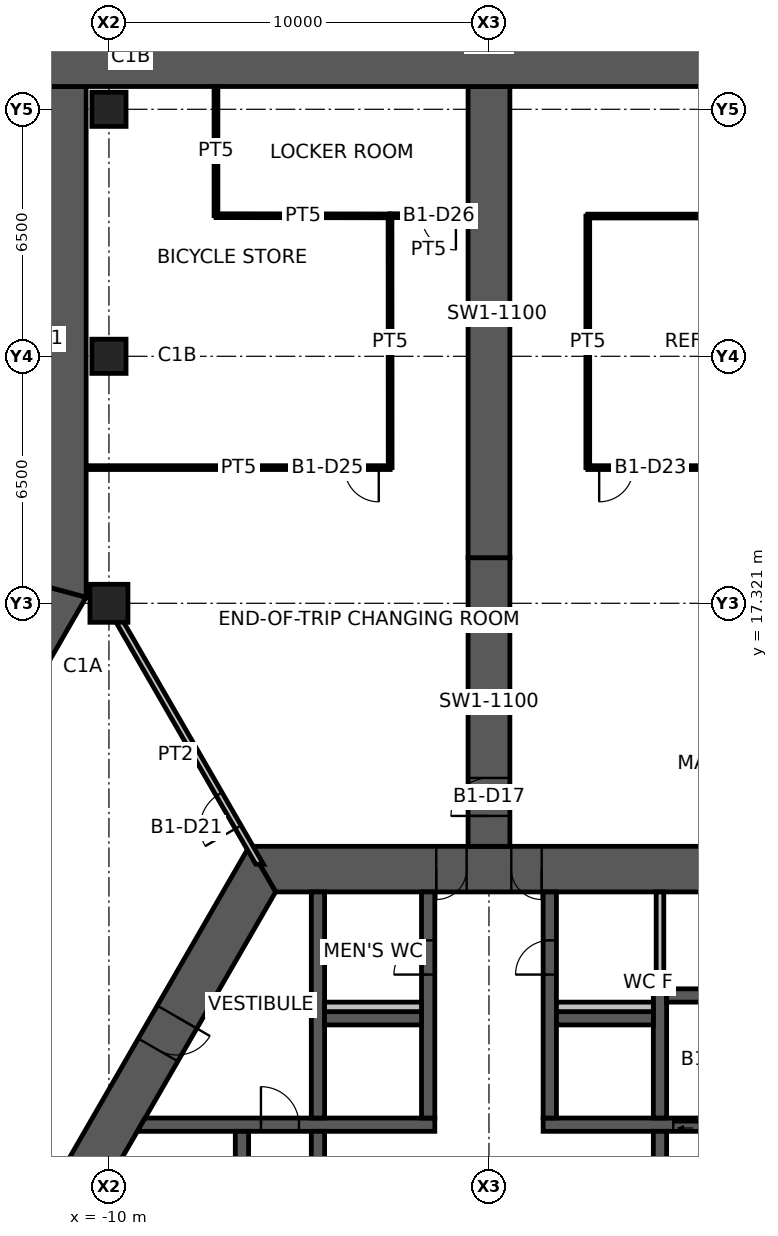
"""IFC4 building model, lengths in metres.
Left out: names, types, materials, properties, quantities, classifications, styles, units other than length and angle.
Written with IfcOpenShell. Run it as: python <this file> out.ifc"""

import sys

from ifc_helpers import new_model, si_unit, direction, frame, frame_2d, origin, origin_2d, place, context, subcontext, project, spatial, polyline, rectangle, hollow_rectangle, outline, extrude, element, fill, save


model = new_model("IFC4")
c1 = context("Model", 3, precision=1e-05, world=origin(), true_north=direction((0.0, 1.0)))
c2 = subcontext(c1, "Body", "Model", "MODEL_VIEW")
j1 = project(units=[si_unit("LENGTHUNIT", "METRE"), si_unit("PLANEANGLEUNIT", "RADIAN")], contexts=[c1])
p1 = place(None, origin())
s1 = spatial("IfcSite", under=j1, at=p1, CompositionType="ELEMENT")
p2 = place(p1, origin())
s2 = spatial("IfcBuilding", under=s1, at=p2, CompositionType="ELEMENT")
p3 = place(p2, frame((0.0, 0.0, -5.0)))
s3 = spatial("IfcBuildingStorey", under=s2, at=p3, CompositionType="ELEMENT", Elevation=-5.0)
p4 = place(p3, frame((-10.0, 17.321, 0.0), z_axis=(0.0, 0.0, 1.0), x_axis=(1.0, 0.0, 0.0)))
e1 = element("IfcColumn", 1, at=p4, inside=s3, PredefinedType="COLUMN", context=c2, shape_type="SweptSolid", body=[
    extrude(hollow_rectangle(XDim=1.0, YDim=1.0, WallThickness=0.06, at=origin_2d()), origin(), (0.0, 0.0, 1.0), 5.0),
])
for number, where, z_axis, x_axis in (
    (2, (-10.0, 23.821, 0.0), (0.0, 0.0, 1.0), (1.0, 0.0, 0.0)),
    (3, (-10.0, 30.321, 0.0), (0.0, 0.0, 1.0), (1.0, 0.0, 0.0)),
):
    element("IfcColumn", number, at=place(p3, frame(where, z_axis=z_axis, x_axis=x_axis)), inside=s3, PredefinedType="COLUMN", context=c2, shape_type="SweptSolid", body=[
        extrude(hollow_rectangle(XDim=0.9, YDim=0.9, WallThickness=0.05, at=origin_2d()), origin(), (0.0, 0.0, 1.0), 5.0),
    ])
p5 = place(p3, frame((5.961, 10.325, 0.0), z_axis=(0.0, 0.0, 1.0), x_axis=(-1.0, 0.0, 0.0)))
e4 = element("IfcWall", 4, at=p5, inside=s3, PredefinedType="SHEAR", context=c2, shape_type="SweptSolid", body=[
    extrude(outline(polyline([(-0.346, -0.6), (4.574, -0.6), (5.374, -0.6), (6.549, -0.6), (7.349, -0.6), (12.269, -0.6), (11.576, 0.6), (7.349, 0.6), (6.549, 0.6), (5.374, 0.6), (4.574, 0.6), (0.346, 0.6), (-0.346, -0.6)])), origin(), (0.0, 0.0, 1.0), 5.0),
])
p6 = place(p5, frame((6.549, 0.0, 0.0)))
e5 = element("IfcOpeningElement", 5, at=p6, cuts=e4, PredefinedType="OPENING", context=c2, shape_type="SweptSolid", body=[
    extrude(rectangle(XDim=0.8, YDim=2.1, at=frame_2d((0.4, 1.05))), frame((0.0, 0.61, 0.0), z_axis=(0.0, -1.0, 0.0), x_axis=(1.0, 0.0, 0.0)), (0.0, 0.0, 1.0), 1.22),
])
p7 = place(p5, frame((4.574, 0.0, 0.0)))
e6 = element("IfcOpeningElement", 6, at=p7, cuts=e4, PredefinedType="OPENING", context=c2, shape_type="SweptSolid", body=[
    extrude(rectangle(XDim=0.8, YDim=2.1, at=frame_2d((0.4, 1.05))), frame((0.0, 0.61, 0.0), z_axis=(0.0, -1.0, 0.0), x_axis=(1.0, 0.0, 0.0)), (0.0, 0.0, 1.0), 1.22),
])
p8 = place(p3, frame((-5.961, 10.325, 0.0), z_axis=(0.0, 0.0, 1.0), x_axis=(-0.500004296715, -0.866022923061, 0.0)))
e7 = element("IfcWall", 7, at=p8, inside=s3, PredefinedType="SHEAR", context=c2, shape_type="SweptSolid", body=[
    extrude(outline(polyline([(-0.346, -0.6), (4.494, -0.6), (5.494, -0.6), (12.269, -0.6), (11.576, 0.6), (5.494, 0.6), (4.494, 0.6), (0.346, 0.6), (-0.346, -0.6)])), origin(), (0.0, 0.0, 1.0), 5.0),
])
p9 = place(p8, frame((4.494, 0.0, 0.0)))
e8 = element("IfcOpeningElement", 8, at=p9, cuts=e7, PredefinedType="OPENING", context=c2, shape_type="SweptSolid", body=[
    extrude(rectangle(XDim=1.0, YDim=2.1, at=frame_2d((0.5, 1.05))), frame((0.0, 0.61, 0.0), z_axis=(0.0, -1.0, 0.0), x_axis=(1.0, 0.0, 0.0)), (0.0, 0.0, 1.0), 1.22),
])
p10 = place(p3, frame((0.0, 10.925, 0.0), z_axis=(0.0, 0.0, 1.0), x_axis=(0.0, 1.0, 0.0)))
e9 = element("IfcWall", 9, at=p10, inside=s3, PredefinedType="SHEAR", context=c2, shape_type="SweptSolid", body=[
    extrude(rectangle(XDim=7.595, YDim=1.1, at=frame_2d((3.798, 0.0))), origin(), (0.0, 0.0, 1.0), 5.0),
])
p11 = place(p10, frame((0.8, 0.0, 0.0)))
e10 = element("IfcOpeningElement", 10, at=p11, cuts=e9, PredefinedType="OPENING", context=c2, shape_type="SweptSolid", body=[
    extrude(rectangle(XDim=1.0, YDim=2.1, at=frame_2d((0.5, 1.05))), frame((0.0, 0.56, 0.0), z_axis=(0.0, -1.0, 0.0), x_axis=(1.0, 0.0, 0.0)), (0.0, 0.0, 1.0), 1.12),
])
p12 = place(p3, frame((0.0, 18.521, 0.0), z_axis=(0.0, 0.0, 1.0), x_axis=(0.0, 1.0, 0.0)))
e11 = element("IfcWall", 11, at=p12, inside=s3, PredefinedType="SHEAR", context=c2, shape_type="SweptSolid", body=[
    extrude(rectangle(XDim=12.4, YDim=1.1, at=frame_2d((6.2, 0.0))), origin(), (0.0, 0.0, 1.0), 5.0),
])
p13 = place(p3, frame((-20.878, 0.878, 0.0), z_axis=(0.0, 0.0, 1.0), x_axis=(0.499998307868, 0.866026380735, 0.0)))
e12 = element("IfcWall", 12, at=p13, inside=s3, PredefinedType="SOLIDWALL", context=c2, shape_type="SweptSolid", body=[
    extrude(outline(polyline([(-0.161, -0.6), (19.518, -0.6), (19.196, 0.6), (0.161, 0.6), (-0.161, -0.6)])), origin(), (0.0, 0.0, 1.0), 5.0),
])
p14 = place(p3, frame((-11.2, 17.642, 0.0), z_axis=(0.0, 0.0, 1.0), x_axis=(0.0, 1.0, 0.0)))
e13 = element("IfcWall", 13, at=p14, inside=s3, PredefinedType="SOLIDWALL", context=c2, shape_type="SweptSolid", body=[
    extrude(outline(polyline([(-0.161, -0.6), (13.278, -0.6), (13.278, 0.6), (0.161, 0.6), (-0.161, -0.6)])), origin(), (0.0, 0.0, 1.0), 5.0),
])
p15 = place(p3, frame((-11.8, 31.521, 0.0), z_axis=(0.0, 0.0, 1.0), x_axis=(1.0, 0.0, 0.0)))
e14 = element("IfcWall", 14, at=p15, inside=s3, PredefinedType="SOLIDWALL", context=c2, shape_type="SweptSolid", body=[
    extrude(rectangle(XDim=23.6, YDim=1.2, at=frame_2d((11.8, 0.0))), origin(), (0.0, 0.0, 1.0), 5.0),
])
p16 = place(p3, frame((-9.151, 3.6, 0.0), z_axis=(0.0, 0.0, 1.0), x_axis=(1.0, 0.0, 0.0)))
e15 = element("IfcWall", 15, at=p16, inside=s3, PredefinedType="SHEAR", context=c2, shape_type="SweptSolid", body=[
    extrude(outline(polyline([(-0.101, -0.175), (3.151, -0.175), (4.151, -0.175), (7.726, -0.175), (7.726, 0.175), (4.151, 0.175), (3.151, 0.175), (0.101, 0.175), (-0.101, -0.175)])), origin(), (0.0, 0.0, 1.0), 5.0),
])
p17 = place(p16, frame((3.151, 0.0, 0.0)))
e16 = element("IfcOpeningElement", 16, at=p17, cuts=e15, PredefinedType="OPENING", context=c2, shape_type="SweptSolid", body=[
    extrude(rectangle(XDim=1.0, YDim=2.1, at=frame_2d((0.5, 1.05))), frame((0.0, 0.185, 0.0), z_axis=(0.0, -1.0, 0.0), x_axis=(1.0, 0.0, 0.0)), (0.0, 0.0, 1.0), 0.37),
])
p18 = place(p3, frame((1.425, 3.6, 0.0), z_axis=(0.0, 0.0, 1.0), x_axis=(1.0, 0.0, 0.0)))
e17 = element("IfcWall", 17, at=p18, inside=s3, PredefinedType="SHEAR", context=c2, shape_type="SweptSolid", body=[
    extrude(outline(polyline([(0.0, -0.175), (3.425, -0.175), (4.725, -0.175), (7.827, -0.175), (7.625, 0.175), (4.725, 0.175), (3.425, 0.175), (0.0, 0.175), (0.0, -0.175)])), origin(), (0.0, 0.0, 1.0), 5.0),
])
p19 = place(p18, frame((3.425, 0.0, 0.0)))
e18 = element("IfcOpeningElement", 18, at=p19, cuts=e17, PredefinedType="OPENING", context=c2, shape_type="SweptSolid", body=[
    extrude(rectangle(XDim=1.3, YDim=2.1, at=frame_2d((0.65, 1.05))), frame((0.0, 0.185, 0.0), z_axis=(0.0, -1.0, 0.0), x_axis=(1.0, 0.0, 0.0)), (0.0, 0.0, 1.0), 0.37),
])
p20 = place(p3, frame((-1.6, 3.775, 0.0), z_axis=(0.0, 0.0, 1.0), x_axis=(0.0, 1.0, 0.0)))
e19 = element("IfcWall", 19, at=p20, inside=s3, PredefinedType="SHEAR", context=c2, shape_type="SweptSolid", body=[
    extrude(rectangle(XDim=5.95, YDim=0.35, at=frame_2d((2.975, 0.0))), origin(), (0.0, 0.0, 1.0), 5.0),
])
p21 = place(p20, frame((3.775, 0.0, 0.0)))
e20 = element("IfcOpeningElement", 20, at=p21, cuts=e19, PredefinedType="OPENING", context=c2, shape_type="SweptSolid", body=[
    extrude(rectangle(XDim=0.9, YDim=2.1, at=frame_2d((0.45, 1.05))), frame((0.0, 0.185, 0.0), z_axis=(0.0, -1.0, 0.0), x_axis=(1.0, 0.0, 0.0)), (0.0, 0.0, 1.0), 0.37),
])
p22 = place(p3, frame((1.6, 3.775, 0.0), z_axis=(0.0, 0.0, 1.0), x_axis=(0.0, 1.0, 0.0)))
e21 = element("IfcWall", 21, at=p22, inside=s3, PredefinedType="SHEAR", context=c2, shape_type="SweptSolid", body=[
    extrude(rectangle(XDim=5.95, YDim=0.35, at=frame_2d((2.975, 0.0))), origin(), (0.0, 0.0, 1.0), 5.0),
])
p23 = place(p22, frame((3.775, 0.0, 0.0)))
e22 = element("IfcOpeningElement", 22, at=p23, cuts=e21, PredefinedType="OPENING", context=c2, shape_type="SweptSolid", body=[
    extrude(rectangle(XDim=0.9, YDim=2.1, at=frame_2d((0.45, 1.05))), frame((0.0, 0.185, 0.0), z_axis=(0.0, -1.0, 0.0), x_axis=(1.0, 0.0, 0.0)), (0.0, 0.0, 1.0), 0.37),
])
p24 = place(p3, frame((-4.5, -3.425, 0.0), z_axis=(0.0, 0.0, 1.0), x_axis=(0.0, 1.0, 0.0)))
e23 = element("IfcWall", 23, at=p24, inside=s3, PredefinedType="SHEAR", context=c2, shape_type="SweptSolid", body=[
    extrude(rectangle(XDim=6.85, YDim=0.35, at=frame_2d((3.425, 0.0))), origin(), (0.0, 0.0, 1.0), 5.0),
])
p25 = place(p24, frame((2.925, 0.0, 0.0)))
e24 = element("IfcOpeningElement", 24, at=p25, cuts=e23, PredefinedType="OPENING", context=c2, shape_type="SweptSolid", body=[
    extrude(rectangle(XDim=1.0, YDim=2.1, at=frame_2d((0.5, 1.05))), frame((0.0, 0.185, 0.0), z_axis=(0.0, -1.0, 0.0), x_axis=(1.0, 0.0, 0.0)), (0.0, 0.0, 1.0), 0.37),
])
p26 = place(p3, frame((4.5, -3.425, 0.0), z_axis=(0.0, 0.0, 1.0), x_axis=(0.0, 1.0, 0.0)))
e25 = element("IfcWall", 25, at=p26, inside=s3, PredefinedType="SHEAR", context=c2, shape_type="SweptSolid", body=[
    extrude(rectangle(XDim=6.85, YDim=0.35, at=frame_2d((3.425, 0.0))), origin(), (0.0, 0.0, 1.0), 5.0),
])
p27 = place(p26, frame((2.925, 0.0, 0.0)))
e26 = element("IfcOpeningElement", 26, at=p27, cuts=e25, PredefinedType="OPENING", context=c2, shape_type="SweptSolid", body=[
    extrude(rectangle(XDim=1.0, YDim=2.1, at=frame_2d((0.5, 1.05))), frame((0.0, 0.185, 0.0), z_axis=(0.0, -1.0, 0.0), x_axis=(1.0, 0.0, 0.0)), (0.0, 0.0, 1.0), 0.37),
])
p28 = place(p3, frame((-6.5, -3.425, 0.0), z_axis=(0.0, 0.0, 1.0), x_axis=(0.0, 1.0, 0.0)))
e27 = element("IfcWall", 27, at=p28, inside=s3, PredefinedType="SHEAR", context=c2, shape_type="SweptSolid", body=[
    extrude(rectangle(XDim=6.85, YDim=0.35, at=frame_2d((3.425, 0.0))), origin(), (0.0, 0.0, 1.0), 5.0),
])
p29 = place(p28, frame((0.1, 0.0, 0.0)))
e28 = element("IfcOpeningElement", 28, at=p29, cuts=e27, PredefinedType="OPENING", context=c2, shape_type="SweptSolid", body=[
    extrude(rectangle(XDim=1.0, YDim=2.1, at=frame_2d((0.5, 1.05))), frame((0.0, 0.185, 0.0), z_axis=(0.0, -1.0, 0.0), x_axis=(1.0, 0.0, 0.0)), (0.0, 0.0, 1.0), 0.37),
])
p30 = place(p3, frame((-4.5, 3.775, 0.0), z_axis=(0.0, 0.0, 1.0), x_axis=(0.0, 1.0, 0.0)))
e29 = element("IfcWall", 29, at=p30, inside=s3, PredefinedType="SHEAR", context=c2, shape_type="SweptSolid", body=[
    extrude(rectangle(XDim=5.95, YDim=0.35, at=frame_2d((2.975, 0.0))), origin(), (0.0, 0.0, 1.0), 5.0),
])
p31 = place(p3, frame((4.5, 3.775, 0.0), z_axis=(0.0, 0.0, 1.0), x_axis=(0.0, 1.0, 0.0)))
e30 = element("IfcWall", 30, at=p31, inside=s3, PredefinedType="SHEAR", context=c2, shape_type="SweptSolid", body=[
    extrude(rectangle(XDim=3.4, YDim=0.35, at=frame_2d((1.7, 0.0))), origin(), (0.0, 0.0, 1.0), 5.0),
])
for number, where, z_axis, x_axis in (
    (31, (-4.325, 6.4, 0.0), (0.0, 0.0, 1.0), (1.0, 0.0, 0.0)),
    (32, (1.775, 6.4, 0.0), (0.0, 0.0, 1.0), (1.0, 0.0, 0.0)),
):
    element("IfcWall", number, at=place(p3, frame(where, z_axis=z_axis, x_axis=x_axis)), inside=s3, PredefinedType="SHEAR", context=c2, shape_type="SweptSolid", body=[
        extrude(rectangle(XDim=2.55, YDim=0.35, at=frame_2d((1.275, 0.0))), origin(), (0.0, 0.0, 1.0), 5.0),
    ])
p32 = place(p3, frame((4.675, 7.0, 0.0), z_axis=(0.0, 0.0, 1.0), x_axis=(1.0, 0.0, 0.0)))
e33 = element("IfcWall", 33, at=p32, inside=s3, PredefinedType="SHEAR", context=c2, shape_type="SweptSolid", body=[
    extrude(rectangle(XDim=2.25, YDim=0.35, at=frame_2d((1.125, 0.0))), origin(), (0.0, 0.0, 1.0), 5.0),
])
p33 = place(p3, frame((4.5, 7.175, 0.0), z_axis=(0.0, 0.0, 1.0), x_axis=(0.0, 1.0, 0.0)))
e34 = element("IfcWall", 34, at=p33, inside=s3, PredefinedType="STANDARD", context=c2, shape_type="SweptSolid", body=[
    extrude(rectangle(XDim=2.55, YDim=0.2, at=frame_2d((1.275, 0.0))), origin(), (0.0, 0.0, 1.0), 5.0),
])
for number, where, z_axis, x_axis in (
    (35, (-4.325, 6.7, 0.0), (0.0, 0.0, 1.0), (1.0, 0.0, 0.0)),
    (36, (1.775, 6.7, 0.0), (0.0, 0.0, 1.0), (1.0, 0.0, 0.0)),
):
    element("IfcWall", number, at=place(p3, frame(where, z_axis=z_axis, x_axis=x_axis)), inside=s3, PredefinedType="PLUMBINGWALL", context=c2, shape_type="SweptSolid", body=[
        extrude(rectangle(XDim=2.55, YDim=0.25, at=frame_2d((1.275, 0.0))), origin(), (0.0, 0.0, 1.0), 5.0),
    ])
p34 = place(p3, frame((-6.035, 10.453, 0.0), z_axis=(0.0, 0.0, 1.0), x_axis=(-0.499993402427, 0.866029212861, 0.0)))
e37 = element("IfcWall", 37, at=p34, inside=s3, PredefinedType="PARTITIONING", context=c2, shape_type="SweptSolid", body=[
    extrude(outline(polyline([(-0.051, -0.087), (1.129, -0.087), (2.129, -0.087), (7.93, -0.087), (7.93, 0.087), (2.129, 0.087), (1.129, 0.087), (0.051, 0.087), (-0.051, -0.087)])), origin(), (0.0, 0.0, 1.0), 3.8),
])
p35 = place(p34, frame((1.129, 0.0, 0.0)))
e38 = element("IfcOpeningElement", 38, at=p35, cuts=e37, PredefinedType="OPENING", context=c2, shape_type="SweptSolid", body=[
    extrude(rectangle(XDim=1.0, YDim=2.1, at=frame_2d((0.5, 1.05))), frame((0.0, 0.098, 0.0), z_axis=(0.0, -1.0, 0.0), x_axis=(1.0, 0.0, 0.0)), (0.0, 0.0, 1.0), 0.195),
])
p36 = place(p3, frame((2.6, 20.891, 0.0), z_axis=(0.0, 0.0, 1.0), x_axis=(0.0, 1.0, 0.0)))
e39 = element("IfcWall", 39, at=p36, inside=s3, PredefinedType="PARTITIONING", context=c2, shape_type="SweptSolid", body=[
    extrude(rectangle(XDim=6.62, YDim=0.1, at=frame_2d((3.31, 0.0))), origin(), (0.0, 0.0, 1.0), 3.7),
])
p37 = place(p3, frame((2.6, 27.511, 0.0), z_axis=(0.0, 0.0, 1.0), x_axis=(1.0, 0.0, 0.0)))
e40 = element("IfcWall", 40, at=p37, inside=s3, PredefinedType="PARTITIONING", context=c2, shape_type="SweptSolid", body=[
    extrude(rectangle(XDim=7.98, YDim=0.1, at=frame_2d((3.99, 0.0))), origin(), (0.0, 0.0, 1.0), 3.7),
])
p38 = place(p3, frame((10.58, 20.891, 0.0), z_axis=(0.0, 0.0, 1.0), x_axis=(-1.0, 0.0, 0.0)))
e41 = element("IfcWall", 41, at=p38, inside=s3, PredefinedType="PARTITIONING", context=c2, shape_type="SweptSolid", body=[
    extrude(rectangle(XDim=7.98, YDim=0.1, at=frame_2d((3.99, 0.0))), origin(), (0.0, 0.0, 1.0), 3.7),
])
p39 = place(p38, frame((6.78, 0.0, 0.0)))
e42 = element("IfcOpeningElement", 42, at=p39, cuts=e41, PredefinedType="OPENING", context=c2, shape_type="SweptSolid", body=[
    extrude(rectangle(XDim=0.9, YDim=2.1, at=frame_2d((0.45, 1.05))), frame((0.0, 0.06, 0.0), z_axis=(0.0, -1.0, 0.0), x_axis=(1.0, 0.0, 0.0)), (0.0, 0.0, 1.0), 0.12),
])
p40 = place(p3, frame((-7.184, 30.919, 0.0), z_axis=(0.0, 0.0, 1.0), x_axis=(7.182876e-05, -0.99999999742, 0.0)))
e43 = element("IfcWall", 43, at=p40, inside=s3, PredefinedType="PARTITIONING", context=c2, shape_type="SweptSolid", body=[
    extrude(rectangle(XDim=3.399, YDim=0.1, at=frame_2d((1.699, 0.0))), origin(), (0.0, 0.0, 1.0), 3.7),
])
p41 = place(p3, frame((-7.183, 27.521, 0.0), z_axis=(0.0, 0.0, 1.0), x_axis=(0.999999374603, -0.00111838882, 0.0)))
e44 = element("IfcWall", 44, at=p41, inside=s3, PredefinedType="PARTITIONING", context=c2, shape_type="SweptSolid", body=[
    extrude(rectangle(XDim=4.584, YDim=0.1, at=frame_2d((2.292, 0.0))), origin(), (0.0, 0.0, 1.0), 3.7),
])
p42 = place(p3, frame((-2.604, 27.52, 0.0), z_axis=(0.0, 0.0, 1.0), x_axis=(0.000589253387, -0.99999982639, 0.0)))
e45 = element("IfcWall", 45, at=p42, inside=s3, PredefinedType="PARTITIONING", context=c2, shape_type="SweptSolid", body=[
    extrude(rectangle(XDim=6.629, YDim=0.1, at=frame_2d((3.314, 0.0))), origin(), (0.0, 0.0, 1.0), 3.7),
])
p43 = place(p3, frame((-2.6, 20.891, 0.0), z_axis=(0.0, 0.0, 1.0), x_axis=(-1.0, 0.0, 0.0)))
e46 = element("IfcWall", 46, at=p43, inside=s3, PredefinedType="PARTITIONING", context=c2, shape_type="SweptSolid", body=[
    extrude(rectangle(XDim=7.98, YDim=0.1, at=frame_2d((3.99, 0.0))), origin(), (0.0, 0.0, 1.0), 3.7),
])
p44 = place(p43, frame((0.3, 0.0, 0.0)))
e47 = element("IfcOpeningElement", 47, at=p44, cuts=e46, PredefinedType="OPENING", context=c2, shape_type="SweptSolid", body=[
    extrude(rectangle(XDim=0.9, YDim=2.1, at=frame_2d((0.45, 1.05))), frame((0.0, 0.06, 0.0), z_axis=(0.0, -1.0, 0.0), x_axis=(1.0, 0.0, 0.0)), (0.0, 0.0, 1.0), 0.12),
])
p45 = place(p3, frame((-0.57, 27.521, 0.0), z_axis=(0.0, 0.0, 1.0), x_axis=(-1.0, 0.0, 0.0)))
e48 = element("IfcWall", 48, at=p45, inside=s3, PredefinedType="PARTITIONING", context=c2, shape_type="SweptSolid", body=[
    extrude(rectangle(XDim=2.034, YDim=0.1, at=frame_2d((1.017, 0.0))), origin(), (0.0, 0.0, 1.0), 3.7),
])
p46 = place(p45, frame((0.3, 0.0, 0.0)))
e49 = element("IfcOpeningElement", 49, at=p46, cuts=e48, PredefinedType="OPENING", context=c2, shape_type="SweptSolid", body=[
    extrude(rectangle(XDim=0.9, YDim=2.1, at=frame_2d((0.45, 1.05))), frame((0.0, 0.06, 0.0), z_axis=(0.0, -1.0, 0.0), x_axis=(1.0, 0.0, 0.0)), (0.0, 0.0, 1.0), 0.12),
])
p47 = place(p6, origin())
e50 = element("IfcDoor", 50, at=p47, inside=s3, OperationType="SINGLE_SWING_RIGHT", PredefinedType="DOOR", context=c2, shape_type="SweptSolid", body=[
    extrude(rectangle(XDim=0.8, YDim=2.1, at=frame_2d((0.4, 1.05))), frame((0.0, 0.025, 0.0), z_axis=(0.0, -1.0, 0.0), x_axis=(1.0, 0.0, 0.0)), (0.0, 0.0, 1.0), 0.05),
])
fill(e5, e50)
p48 = place(p7, origin())
e51 = element("IfcDoor", 51, at=p48, inside=s3, OperationType="SINGLE_SWING_LEFT", PredefinedType="DOOR", context=c2, shape_type="SweptSolid", body=[
    extrude(rectangle(XDim=0.8, YDim=2.1, at=frame_2d((0.4, 1.05))), frame((0.0, 0.025, 0.0), z_axis=(0.0, -1.0, 0.0), x_axis=(1.0, 0.0, 0.0)), (0.0, 0.0, 1.0), 0.05),
])
fill(e6, e51)
p49 = place(p9, origin())
e52 = element("IfcDoor", 52, at=p49, inside=s3, OperationType="SINGLE_SWING_LEFT", PredefinedType="DOOR", context=c2, shape_type="SweptSolid", body=[
    extrude(rectangle(XDim=1.0, YDim=2.1, at=frame_2d((0.5, 1.05))), frame((0.0, 0.025, 0.0), z_axis=(0.0, -1.0, 0.0), x_axis=(1.0, 0.0, 0.0)), (0.0, 0.0, 1.0), 0.05),
])
fill(e8, e52)
p50 = place(p17, origin())
e53 = element("IfcDoor", 53, at=p50, inside=s3, OperationType="SINGLE_SWING_LEFT", PredefinedType="DOOR", context=c2, shape_type="SweptSolid", body=[
    extrude(rectangle(XDim=1.0, YDim=2.1, at=frame_2d((0.5, 1.05))), frame((0.0, 0.025, 0.0), z_axis=(0.0, -1.0, 0.0), x_axis=(1.0, 0.0, 0.0)), (0.0, 0.0, 1.0), 0.05),
])
fill(e16, e53)
p51 = place(p21, origin())
e54 = element("IfcDoor", 54, at=p51, inside=s3, OperationType="SINGLE_SWING_LEFT", PredefinedType="DOOR", context=c2, shape_type="SweptSolid", body=[
    extrude(rectangle(XDim=0.9, YDim=2.1, at=frame_2d((0.45, 1.05))), frame((0.0, 0.025, 0.0), z_axis=(0.0, -1.0, 0.0), x_axis=(1.0, 0.0, 0.0)), (0.0, 0.0, 1.0), 0.05),
])
fill(e20, e54)
p52 = place(p23, origin())
e55 = element("IfcDoor", 55, at=p52, inside=s3, OperationType="SINGLE_SWING_LEFT", PredefinedType="DOOR", context=c2, shape_type="SweptSolid", body=[
    extrude(rectangle(XDim=0.9, YDim=2.1, at=frame_2d((0.45, 1.05))), frame((0.0, 0.025, 0.0), z_axis=(0.0, -1.0, 0.0), x_axis=(1.0, 0.0, 0.0)), (0.0, 0.0, 1.0), 0.05),
])
fill(e22, e55)
p53 = place(p11, origin())
e56 = element("IfcDoor", 56, at=p53, inside=s3, OperationType="SINGLE_SWING_LEFT", PredefinedType="DOOR", context=c2, shape_type="SweptSolid", body=[
    extrude(rectangle(XDim=1.0, YDim=2.1, at=frame_2d((0.5, 1.05))), frame((0.0, 0.025, 0.0), z_axis=(0.0, -1.0, 0.0), x_axis=(1.0, 0.0, 0.0)), (0.0, 0.0, 1.0), 0.05),
])
fill(e10, e56)
p54 = place(p35, origin())
e57 = element("IfcDoor", 57, at=p54, inside=s3, OperationType="SINGLE_SWING_LEFT", PredefinedType="DOOR", context=c2, shape_type="SweptSolid", body=[
    extrude(rectangle(XDim=1.0, YDim=2.1, at=frame_2d((0.5, 1.05))), frame((0.0, 0.025, 0.0), z_axis=(0.0, -1.0, 0.0), x_axis=(1.0, 0.0, 0.0)), (0.0, 0.0, 1.0), 0.05),
])
fill(e38, e57)
p55 = place(p39, origin())
e58 = element("IfcDoor", 58, at=p55, inside=s3, OperationType="SINGLE_SWING_RIGHT", PredefinedType="DOOR", context=c2, shape_type="SweptSolid", body=[
    extrude(rectangle(XDim=0.9, YDim=2.1, at=frame_2d((0.45, 1.05))), frame((0.0, 0.025, 0.0), z_axis=(0.0, -1.0, 0.0), x_axis=(1.0, 0.0, 0.0)), (0.0, 0.0, 1.0), 0.05),
])
fill(e42, e58)
p56 = place(p44, origin())
e59 = element("IfcDoor", 59, at=p56, inside=s3, OperationType="SINGLE_SWING_LEFT", PredefinedType="DOOR", context=c2, shape_type="SweptSolid", body=[
    extrude(rectangle(XDim=0.9, YDim=2.1, at=frame_2d((0.45, 1.05))), frame((0.0, 0.025, 0.0), z_axis=(0.0, -1.0, 0.0), x_axis=(1.0, 0.0, 0.0)), (0.0, 0.0, 1.0), 0.05),
])
fill(e47, e59)
p57 = place(p46, origin())
e60 = element("IfcDoor", 60, at=p57, inside=s3, OperationType="SINGLE_SWING_LEFT", PredefinedType="DOOR", context=c2, shape_type="SweptSolid", body=[
    extrude(rectangle(XDim=0.9, YDim=2.1, at=frame_2d((0.45, 1.05))), frame((0.0, 0.025, 0.0), z_axis=(0.0, -1.0, 0.0), x_axis=(1.0, 0.0, 0.0)), (0.0, 0.0, 1.0), 0.05),
])
fill(e49, e60)
p58 = place(p19, origin())
e61 = element("IfcDoor", 61, at=p58, inside=s3, OperationType="DOUBLE_DOOR_SLIDING", PredefinedType="DOOR", context=c2, shape_type="SweptSolid", body=[
    extrude(rectangle(XDim=1.3, YDim=2.1, at=frame_2d((0.65, 1.05))), frame((0.0, 0.025, 0.0), z_axis=(0.0, -1.0, 0.0), x_axis=(1.0, 0.0, 0.0)), (0.0, 0.0, 1.0), 0.05),
])
fill(e18, e61)
save(model, sys.argv[1])
